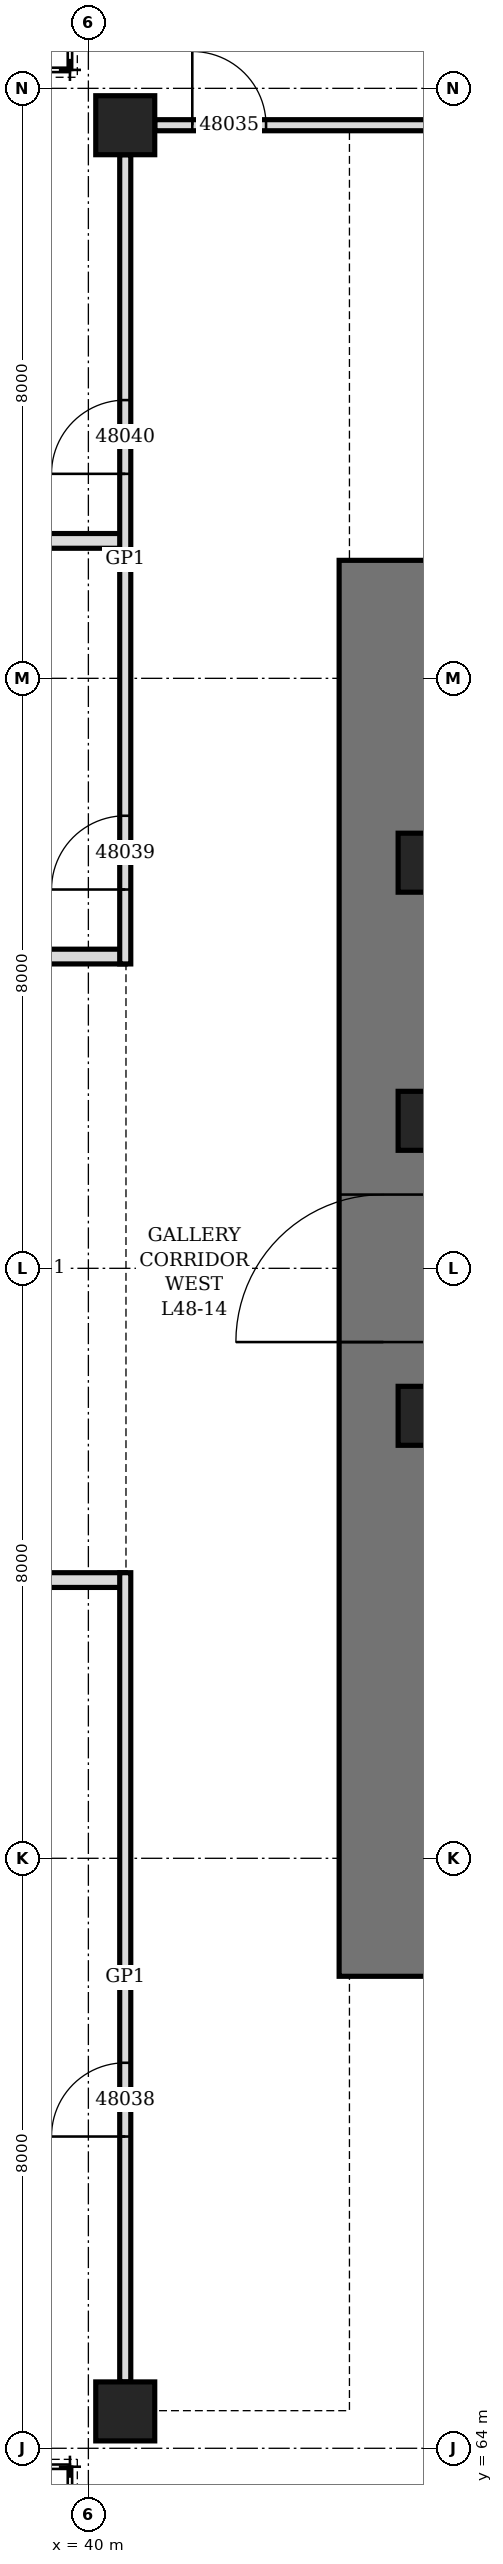
"""IFC4 building model, lengths in metres.
Left out: names, types, materials, properties, quantities, classifications, styles, units other than length and angle.
Written with IfcOpenShell. Run it as: python <this file> out.ifc"""

import sys

from ifc_helpers import new_model, si_unit, direction, frame, frame_2d, origin, origin_2d, place, context, subcontext, project, spatial, rectangle, hollow_rectangle, extrude, element, fill, save


model = new_model("IFC4")
c1 = context("Model", 3, precision=1e-05, world=origin(), true_north=direction((0.0, 1.0)))
c2 = subcontext(c1, "Body", "Model", "MODEL_VIEW")
j1 = project(units=[si_unit("LENGTHUNIT", "METRE"), si_unit("PLANEANGLEUNIT", "RADIAN")], contexts=[c1])
p1 = place(None, origin())
s1 = spatial("IfcSite", under=j1, at=p1, CompositionType="ELEMENT")
p2 = place(p1, origin())
s2 = spatial("IfcBuilding", under=s1, at=p2, CompositionType="ELEMENT")
p3 = place(p2, frame((0.0, 0.0, 214.9)))
s3 = spatial("IfcBuildingStorey", under=s2, at=p3, CompositionType="ELEMENT", Elevation=214.9)
for number, where, z_axis, x_axis in (
    (1, (40.5, 95.5, 0.0), (0.0, 0.0, 1.0), (1.0, 0.0, 0.0)),
    (2, (40.5, 64.5, 0.0), (0.0, 0.0, 1.0), (0.0, 1.0, 0.0)),
):
    element("IfcColumn", number, at=place(p3, frame(where, z_axis=z_axis, x_axis=x_axis)), inside=s3, PredefinedType="COLUMN", context=c2, shape_type="SweptSolid", body=[
        extrude(hollow_rectangle(XDim=0.8, YDim=0.8, WallThickness=0.08, at=origin_2d()), origin(), (0.0, 0.0, 1.0), 4.2),
    ])
p4 = place(p3, frame((44.0, 70.4, 0.0), z_axis=(0.0, 0.0, 1.0), x_axis=(0.0, 1.0, 0.0)))
e3 = element("IfcWall", 3, at=p4, inside=s3, PredefinedType="SHEAR", context=c2, shape_type="SweptSolid", body=[
    extrude(rectangle(XDim=19.2, YDim=1.2, at=frame_2d((9.6, 0.0))), origin(), (0.0, 0.0, 1.0), 4.2),
])
p5 = place(p4, frame((8.6, 0.0, 0.0)))
e4 = element("IfcOpeningElement", 4, at=p5, cuts=e3, PredefinedType="OPENING", context=c2, shape_type="SweptSolid", body=[
    extrude(rectangle(XDim=2.0, YDim=2.4, at=frame_2d((1.0, 1.2))), frame((0.0, 0.61, 0.0), z_axis=(0.0, -1.0, 0.0), x_axis=(1.0, 0.0, 0.0)), (0.0, 0.0, 1.0), 1.22),
])
for number, where, z_axis, x_axis in (
    (5, (44.6, 78.0, 0.0), (0.0, 0.0, 1.0), (1.0, 0.0, 0.0)),
    (6, (44.6, 82.0, 0.0), (0.0, 0.0, 1.0), (1.0, 0.0, 0.0)),
    (7, (44.6, 85.5, 0.0), (0.0, 0.0, 1.0), (1.0, 0.0, 0.0)),
):
    element("IfcColumn", number, at=place(p3, frame(where, z_axis=z_axis, x_axis=x_axis)), inside=s3, PredefinedType="COLUMN", context=c2, shape_type="SweptSolid", body=[
        extrude(hollow_rectangle(XDim=0.8, YDim=0.8, WallThickness=0.1, at=origin_2d()), origin(), (0.0, 0.0, 1.0), 4.2),
    ])
for number, where, z_axis, x_axis in (
    (8, (35.4, 75.773, 0.0), (0.0, 0.0, 1.0), (1.0, 0.0, 0.0)),
    (9, (35.4, 84.227, 0.0), (0.0, 0.0, 1.0), (1.0, 0.0, 0.0)),
    (10, (35.4, 89.864, 0.0), (0.0, 0.0, 1.0), (1.0, 0.0, 0.0)),
):
    element("IfcWall", number, at=place(p3, frame(where, z_axis=z_axis, x_axis=x_axis)), inside=s3, PredefinedType="PARTITIONING", context=c2, shape_type="SweptSolid", body=[
        extrude(rectangle(XDim=5.1, YDim=0.2, at=frame_2d((2.55, 0.0))), origin(), (0.0, 0.0, 1.0), 3.428),
    ])
p6 = place(p3, frame((40.9, 95.5, 0.0), z_axis=(0.0, 0.0, 1.0), x_axis=(1.0, 0.0, 0.0)))
e11 = element("IfcWall", 11, at=p6, inside=s3, PredefinedType="PARTITIONING", context=c2, shape_type="SweptSolid", body=[
    extrude(rectangle(XDim=10.973, YDim=0.15, at=frame_2d((5.486, 0.0))), origin(), (0.0, 0.0, 1.0), 4.04),
])
p7 = place(p6, frame((0.509, 0.0, 0.0)))
e12 = element("IfcOpeningElement", 12, at=p7, cuts=e11, PredefinedType="OPENING", context=c2, shape_type="SweptSolid", body=[
    extrude(rectangle(XDim=1.0, YDim=2.4, at=frame_2d((0.5, 1.2))), frame((0.0, 0.085, 0.0), z_axis=(0.0, -1.0, 0.0), x_axis=(1.0, 0.0, 0.0)), (0.0, 0.0, 1.0), 0.17),
])
p8 = place(p6, frame((6.146, 0.0, 0.0)))
e13 = element("IfcOpeningElement", 13, at=p8, cuts=e11, PredefinedType="OPENING", context=c2, shape_type="SweptSolid", body=[
    extrude(rectangle(XDim=1.0, YDim=2.1, at=frame_2d((0.5, 1.05))), frame((0.0, 0.085, 0.0), z_axis=(0.0, -1.0, 0.0), x_axis=(1.0, 0.0, 0.0)), (0.0, 0.0, 1.0), 0.17),
])
p9 = place(p3, frame((40.5, 64.9, 0.0), z_axis=(0.0, 0.0, 1.0), x_axis=(0.0, 1.0, 0.0)))
e14 = element("IfcWall", 14, at=p9, inside=s3, PredefinedType="PARTITIONING", context=c2, shape_type="SweptSolid", body=[
    extrude(rectangle(XDim=10.973, YDim=0.15, at=frame_2d((5.486, 0.0))), origin(), (0.0, 0.0, 1.0), 4.04),
])
p10 = place(p9, frame((3.327, 0.0, 0.0)))
e15 = element("IfcOpeningElement", 15, at=p10, cuts=e14, PredefinedType="OPENING", context=c2, shape_type="SweptSolid", body=[
    extrude(rectangle(XDim=1.0, YDim=2.4, at=frame_2d((0.5, 1.2))), frame((0.0, 0.085, 0.0), z_axis=(0.0, -1.0, 0.0), x_axis=(1.0, 0.0, 0.0)), (0.0, 0.0, 1.0), 0.17),
])
p11 = place(p3, frame((40.5, 84.127, 0.0), z_axis=(0.0, 0.0, 1.0), x_axis=(0.0, 1.0, 0.0)))
e16 = element("IfcWall", 16, at=p11, inside=s3, PredefinedType="PARTITIONING", context=c2, shape_type="SweptSolid", body=[
    extrude(rectangle(XDim=10.973, YDim=0.15, at=frame_2d((5.486, 0.0))), origin(), (0.0, 0.0, 1.0), 4.04),
])
p12 = place(p11, frame((1.009, 0.0, 0.0)))
e17 = element("IfcOpeningElement", 17, at=p12, cuts=e16, PredefinedType="OPENING", context=c2, shape_type="SweptSolid", body=[
    extrude(rectangle(XDim=1.0, YDim=2.4, at=frame_2d((0.5, 1.2))), frame((0.0, 0.085, 0.0), z_axis=(0.0, -1.0, 0.0), x_axis=(1.0, 0.0, 0.0)), (0.0, 0.0, 1.0), 0.17),
])
p13 = place(p11, frame((6.646, 0.0, 0.0)))
e18 = element("IfcOpeningElement", 18, at=p13, cuts=e16, PredefinedType="OPENING", context=c2, shape_type="SweptSolid", body=[
    extrude(rectangle(XDim=1.0, YDim=2.4, at=frame_2d((0.5, 1.2))), frame((0.0, 0.085, 0.0), z_axis=(0.0, -1.0, 0.0), x_axis=(1.0, 0.0, 0.0)), (0.0, 0.0, 1.0), 0.17),
])
p14 = place(p5, origin())
e19 = element("IfcDoor", 19, at=p14, inside=s3, OperationType="DOUBLE_DOOR_SINGLE_SWING", PredefinedType="DOOR", context=c2, shape_type="SweptSolid", body=[
    extrude(rectangle(XDim=2.0, YDim=2.4, at=frame_2d((1.0, 1.2))), frame((0.0, 0.35, 0.0), z_axis=(0.0, -1.0, 0.0), x_axis=(1.0, 0.0, 0.0)), (0.0, 0.0, 1.0), 0.7),
])
fill(e4, e19)
p15 = place(p7, origin())
e20 = element("IfcDoor", 20, at=p15, inside=s3, OperationType="SINGLE_SWING_RIGHT", PredefinedType="DOOR", context=c2, shape_type="SweptSolid", body=[
    extrude(rectangle(XDim=1.0, YDim=2.4, at=frame_2d((0.5, 1.2))), frame((0.0, 0.075, 0.0), z_axis=(0.0, -1.0, 0.0), x_axis=(1.0, 0.0, 0.0)), (0.0, 0.0, 1.0), 0.149),
])
fill(e12, e20)
p16 = place(p10, origin())
e21 = element("IfcDoor", 21, at=p16, inside=s3, OperationType="SINGLE_SWING_RIGHT", PredefinedType="DOOR", context=c2, shape_type="SweptSolid", body=[
    extrude(rectangle(XDim=1.0, YDim=2.4, at=frame_2d((0.5, 1.2))), frame((0.0, 0.075, 0.0), z_axis=(0.0, -1.0, 0.0), x_axis=(1.0, 0.0, 0.0)), (0.0, 0.0, 1.0), 0.149),
])
fill(e15, e21)
p17 = place(p12, origin())
e22 = element("IfcDoor", 22, at=p17, inside=s3, OperationType="SINGLE_SWING_RIGHT", PredefinedType="DOOR", context=c2, shape_type="SweptSolid", body=[
    extrude(rectangle(XDim=1.0, YDim=2.4, at=frame_2d((0.5, 1.2))), frame((0.0, 0.075, 0.0), z_axis=(0.0, -1.0, 0.0), x_axis=(1.0, 0.0, 0.0)), (0.0, 0.0, 1.0), 0.149),
])
fill(e17, e22)
p18 = place(p13, origin())
e23 = element("IfcDoor", 23, at=p18, inside=s3, OperationType="SINGLE_SWING_RIGHT", PredefinedType="DOOR", context=c2, shape_type="SweptSolid", body=[
    extrude(rectangle(XDim=1.0, YDim=2.4, at=frame_2d((0.5, 1.2))), frame((0.0, 0.075, 0.0), z_axis=(0.0, -1.0, 0.0), x_axis=(1.0, 0.0, 0.0)), (0.0, 0.0, 1.0), 0.149),
])
fill(e18, e23)
save(model, sys.argv[1])
